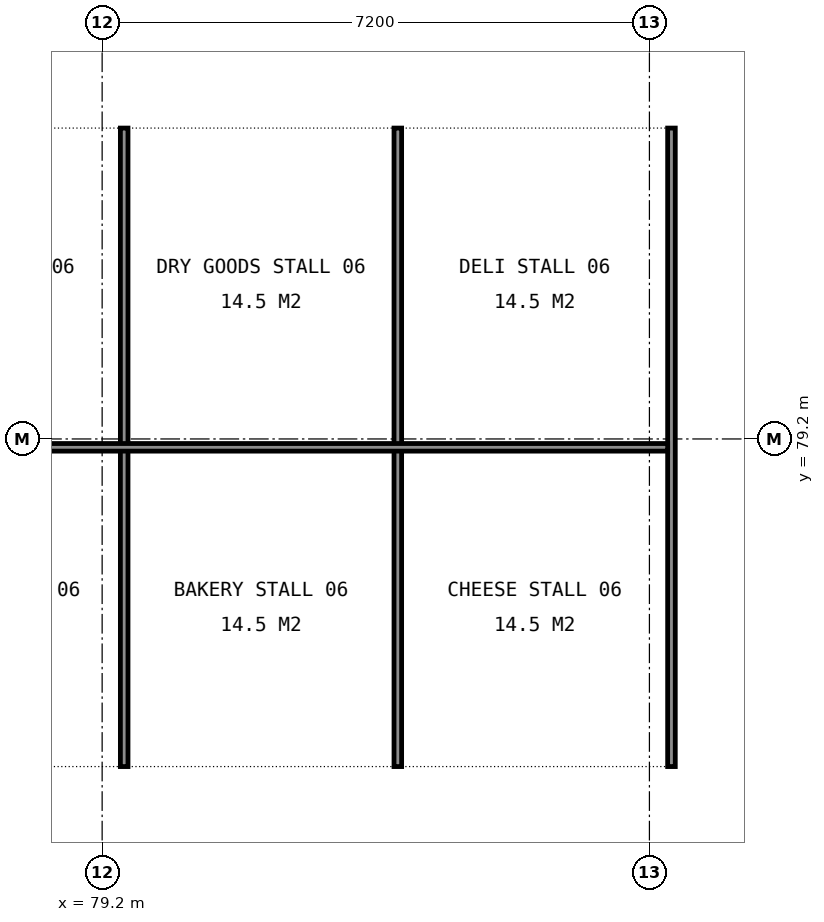
"""IFC4 building model, lengths in metres.
Left out: names, types, materials, properties, quantities, classifications, styles, units other than length and angle.
Written with IfcOpenShell. Run it as: python <this file> out.ifc"""

import sys

from ifc_helpers import new_model, si_unit, direction, frame, frame_2d, origin, place, context, subcontext, project, spatial, rectangle, extrude, element, save


model = new_model("IFC4")
c1 = context("Model", 3, precision=1e-05, world=origin(), true_north=direction((0.0, 1.0)))
c2 = subcontext(c1, "Body", "Model", "MODEL_VIEW")
j1 = project(units=[si_unit("LENGTHUNIT", "METRE"), si_unit("PLANEANGLEUNIT", "RADIAN")], contexts=[c1])
p1 = place(None, origin())
s1 = spatial("IfcSite", under=j1, at=p1, CompositionType="ELEMENT")
p2 = place(p1, origin())
s2 = spatial("IfcBuilding", under=s1, at=p2, CompositionType="ELEMENT")
p3 = place(p2, origin())
s3 = spatial("IfcBuildingStorey", under=s2, at=p3, CompositionType="ELEMENT", Elevation=0.0)
for number, where, z_axis, x_axis in (
    (1, (79.49, 74.89, 0.0), (0.0, 0.0, 1.0), (0.0, 1.0, 0.0)),
    (2, (83.09, 74.89, 0.0), (0.0, 0.0, 1.0), (0.0, 1.0, 0.0)),
    (3, (86.69, 74.89, 0.0), (0.0, 0.0, 1.0), (0.0, 1.0, 0.0)),
):
    element("IfcWall", number, at=place(p3, frame(where, z_axis=z_axis, x_axis=x_axis)), inside=s3, PredefinedType="PARTITIONING", context=c2, shape_type="SweptSolid", body=[
        extrude(rectangle(XDim=8.4, YDim=0.1, at=frame_2d((4.2, 0.0))), origin(), (0.0, 0.0, 1.0), 1.2),
    ])
p4 = place(p3, frame((75.94, 79.09, 0.0), z_axis=(0.0, 0.0, 1.0), x_axis=(1.0, 0.0, 0.0)))
e4 = element("IfcWall", 4, at=p4, inside=s3, PredefinedType="PARTITIONING", context=c2, shape_type="SweptSolid", body=[
    extrude(rectangle(XDim=10.7, YDim=0.1, at=frame_2d((5.35, 0.0))), origin(), (0.0, 0.0, 1.0), 1.2),
])
save(model, sys.argv[1])
